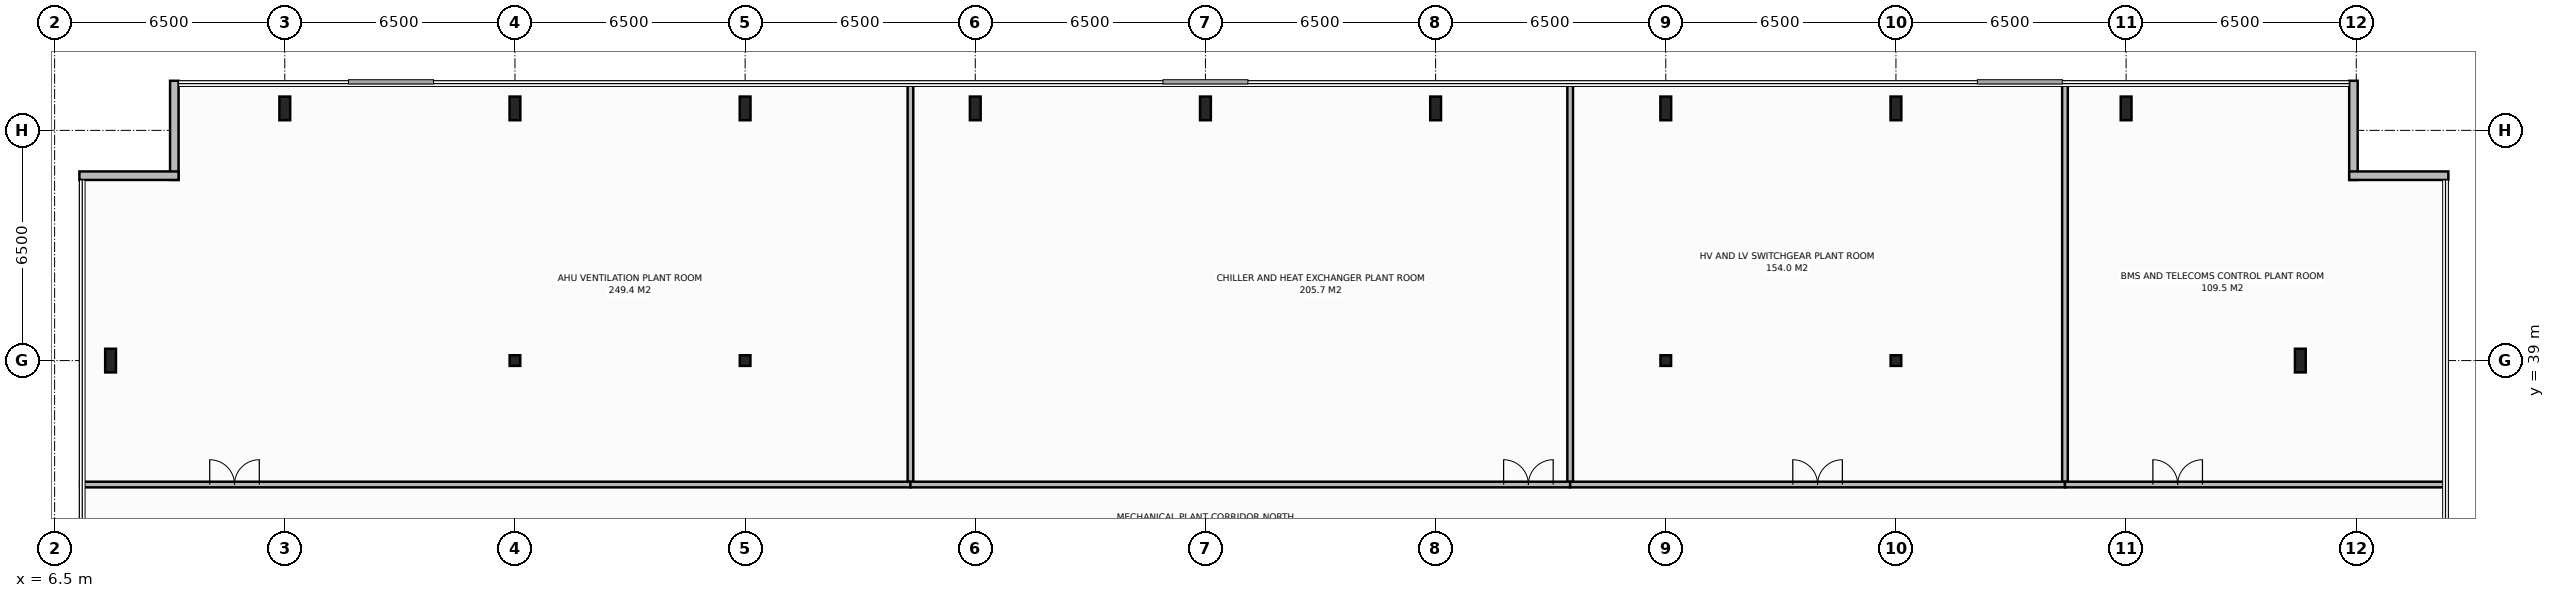
"""IFC4 building model, lengths in metres.
Left out: names, types, materials, properties, quantities, classifications, styles, units other than length and angle.
Written with IfcOpenShell. Run it as: python <this file> out.ifc"""

import sys

from ifc_helpers import new_model, si_unit, direction, frame, frame_2d, origin, origin_2d, place, context, subcontext, project, spatial, rectangle, i_section, extrude, element, fill, save


model = new_model("IFC4")
c1 = context("Model", 3, precision=1e-05, world=origin(), true_north=direction((0.0, 1.0)))
c2 = subcontext(c1, "Body", "Model", "MODEL_VIEW")
j1 = project(units=[si_unit("LENGTHUNIT", "METRE"), si_unit("PLANEANGLEUNIT", "RADIAN")], contexts=[c1])
p1 = place(None, origin())
s1 = spatial("IfcSite", under=j1, at=p1, CompositionType="ELEMENT")
p2 = place(p1, origin())
s2 = spatial("IfcBuilding", under=s1, at=p2, CompositionType="ELEMENT")
p3 = place(p2, frame((0.0, 0.0, 315.4)))
s3 = spatial("IfcBuildingStorey", under=s2, at=p3, CompositionType="ELEMENT", Elevation=315.4)
for number, where, z_axis, x_axis in (
    (1, (19.5, 39.0, 0.0), (0.0, 0.0, 1.0), (1.0, 0.0, 0.0)),
    (2, (58.5, 39.0, 0.0), (0.0, 0.0, 1.0), (1.0, 0.0, 0.0)),
    (3, (26.0, 39.0, 0.0), (0.0, 0.0, 1.0), (1.0, 0.0, 0.0)),
    (4, (52.0, 39.0, 0.0), (0.0, 0.0, 1.0), (1.0, 0.0, 0.0)),
):
    element("IfcColumn", number, at=place(p3, frame(where, z_axis=z_axis, x_axis=x_axis)), inside=s3, PredefinedType="COLUMN", context=c2, shape_type="SweptSolid", body=[
        extrude(i_section(OverallWidth=0.3, OverallDepth=0.3, WebThickness=0.011, FlangeThickness=0.019, at=origin_2d()), origin(), (0.0, 0.0, 1.0), 5.0),
    ])
for number, where, z_axis, x_axis in (
    (5, (13.0, 46.12, 0.0), (0.0, 0.0, 1.0), (1.0, 0.0, 0.0)),
    (6, (19.5, 46.12, 0.0), (0.0, 0.0, 1.0), (1.0, 0.0, 0.0)),
    (7, (26.0, 46.12, 0.0), (0.0, 0.0, 1.0), (1.0, 0.0, 0.0)),
    (8, (32.5, 46.12, 0.0), (0.0, 0.0, 1.0), (1.0, 0.0, 0.0)),
    (9, (39.0, 46.12, 0.0), (0.0, 0.0, 1.0), (1.0, 0.0, 0.0)),
    (10, (45.5, 46.12, 0.0), (0.0, 0.0, 1.0), (1.0, 0.0, 0.0)),
    (11, (52.0, 46.12, 0.0), (0.0, 0.0, 1.0), (1.0, 0.0, 0.0)),
    (12, (58.5, 46.12, 0.0), (0.0, 0.0, 1.0), (1.0, 0.0, 0.0)),
    (13, (65.0, 46.12, 0.0), (0.0, 0.0, 1.0), (1.0, 0.0, 0.0)),
    (14, (8.08, 39.0, 0.0), (0.0, 0.0, 1.0), (1.0, 0.0, 0.0)),
    (15, (69.92, 39.0, 0.0), (0.0, 0.0, 1.0), (1.0, 0.0, 0.0)),
):
    element("IfcColumn", number, at=place(p3, frame(where, z_axis=z_axis, x_axis=x_axis)), inside=s3, PredefinedType="COLUMN", context=c2, shape_type="SweptSolid", body=[
        extrude(i_section(OverallWidth=0.305, OverallDepth=0.668, WebThickness=0.021, FlangeThickness=0.04, at=origin_2d()), origin(), (0.0, 0.0, 1.0), 5.0),
    ])
p4 = place(p3, frame((9.88, 44.1, 0.0), z_axis=(0.0, 0.0, 1.0), x_axis=(0.0, 1.0, 0.0)))
e16 = element("IfcWall", 16, at=p4, inside=s3, PredefinedType="STANDARD", context=c2, shape_type="SweptSolid", body=[
    extrude(rectangle(XDim=2.8, YDim=0.24, at=frame_2d((1.4, 0.0))), origin(), (0.0, 0.0, 1.0), 4.58),
])
p5 = place(p3, frame((7.2, 44.22, 0.0), z_axis=(0.0, 0.0, 1.0), x_axis=(1.0, 0.0, 0.0)))
e17 = element("IfcWall", 17, at=p5, inside=s3, PredefinedType="STANDARD", context=c2, shape_type="SweptSolid", body=[
    extrude(rectangle(XDim=2.8, YDim=0.24, at=frame_2d((1.4, 0.0))), origin(), (0.0, 0.0, 1.0), 4.58),
])
p6 = place(p3, frame((71.42, 46.9, 0.0), z_axis=(0.0, 0.0, 1.0), x_axis=(0.0, -1.0, 0.0)))
e18 = element("IfcWall", 18, at=p6, inside=s3, PredefinedType="STANDARD", context=c2, shape_type="SweptSolid", body=[
    extrude(rectangle(XDim=2.8, YDim=0.24, at=frame_2d((1.4, 0.0))), origin(), (0.0, 0.0, 1.0), 4.58),
])
p7 = place(p3, frame((71.3, 44.22, 0.0), z_axis=(0.0, 0.0, 1.0), x_axis=(1.0, 0.0, 0.0)))
e19 = element("IfcWall", 19, at=p7, inside=s3, PredefinedType="STANDARD", context=c2, shape_type="SweptSolid", body=[
    extrude(rectangle(XDim=2.8, YDim=0.24, at=frame_2d((1.4, 0.0))), origin(), (0.0, 0.0, 1.0), 4.58),
])
p8 = place(p3, frame((30.669, 35.5, 0.0), z_axis=(0.0, 0.0, 1.0), x_axis=(0.0, 1.0, 0.0)))
e20 = element("IfcWall", 20, at=p8, inside=s3, PredefinedType="STANDARD", context=c2, shape_type="SweptSolid", body=[
    extrude(rectangle(XDim=11.38, YDim=0.16, at=frame_2d((5.69, 0.0))), origin(), (0.0, 0.0, 1.0), 4.58),
])
p9 = place(p3, frame((7.22, 35.5, 0.0), z_axis=(0.0, 0.0, 1.0), x_axis=(1.0, 0.0, 0.0)))
e21 = element("IfcWall", 21, at=p9, inside=s3, PredefinedType="STANDARD", context=c2, shape_type="SweptSolid", body=[
    extrude(rectangle(XDim=23.449, YDim=0.16, at=frame_2d((11.725, 0.0))), origin(), (0.0, 0.0, 1.0), 4.58),
])
p10 = place(p9, frame((3.66, 0.0, 0.0)))
e22 = element("IfcOpeningElement", 22, at=p10, cuts=e21, PredefinedType="OPENING", context=c2, shape_type="SweptSolid", body=[
    extrude(rectangle(XDim=1.4, YDim=2.2, at=frame_2d((0.7, 1.1))), frame((0.0, 0.09, 0.0), z_axis=(0.0, -1.0, 0.0), x_axis=(1.0, 0.0, 0.0)), (0.0, 0.0, 1.0), 0.18),
])
p11 = place(p3, frame((49.3, 35.5, 0.0), z_axis=(0.0, 0.0, 1.0), x_axis=(0.0, 1.0, 0.0)))
e23 = element("IfcWall", 23, at=p11, inside=s3, PredefinedType="STANDARD", context=c2, shape_type="SweptSolid", body=[
    extrude(rectangle(XDim=11.38, YDim=0.16, at=frame_2d((5.69, 0.0))), origin(), (0.0, 0.0, 1.0), 4.58),
])
p12 = place(p3, frame((30.669, 35.5, 0.0), z_axis=(0.0, 0.0, 1.0), x_axis=(1.0, 0.0, 0.0)))
e24 = element("IfcWall", 24, at=p12, inside=s3, PredefinedType="STANDARD", context=c2, shape_type="SweptSolid", body=[
    extrude(rectangle(XDim=18.631, YDim=0.16, at=frame_2d((9.316, 0.0))), origin(), (0.0, 0.0, 1.0), 4.58),
])
p13 = place(p12, frame((16.751, 0.0, 0.0)))
e25 = element("IfcOpeningElement", 25, at=p13, cuts=e24, PredefinedType="OPENING", context=c2, shape_type="SweptSolid", body=[
    extrude(rectangle(XDim=1.4, YDim=2.2, at=frame_2d((0.7, 1.1))), frame((0.0, 0.09, 0.0), z_axis=(0.0, -1.0, 0.0), x_axis=(1.0, 0.0, 0.0)), (0.0, 0.0, 1.0), 0.18),
])
p14 = place(p3, frame((63.274, 35.5, 0.0), z_axis=(0.0, 0.0, 1.0), x_axis=(0.0, 1.0, 0.0)))
e26 = element("IfcWall", 26, at=p14, inside=s3, PredefinedType="STANDARD", context=c2, shape_type="SweptSolid", body=[
    extrude(rectangle(XDim=11.38, YDim=0.16, at=frame_2d((5.69, 0.0))), origin(), (0.0, 0.0, 1.0), 4.58),
])
p15 = place(p3, frame((49.3, 35.5, 0.0), z_axis=(0.0, 0.0, 1.0), x_axis=(1.0, 0.0, 0.0)))
e27 = element("IfcWall", 27, at=p15, inside=s3, PredefinedType="STANDARD", context=c2, shape_type="SweptSolid", body=[
    extrude(rectangle(XDim=13.973, YDim=0.16, at=frame_2d((6.987, 0.0))), origin(), (0.0, 0.0, 1.0), 4.58),
])
p16 = place(p15, frame((6.287, 0.0, 0.0)))
e28 = element("IfcOpeningElement", 28, at=p16, cuts=e27, PredefinedType="OPENING", context=c2, shape_type="SweptSolid", body=[
    extrude(rectangle(XDim=1.4, YDim=2.2, at=frame_2d((0.7, 1.1))), frame((0.0, 0.09, 0.0), z_axis=(0.0, -1.0, 0.0), x_axis=(1.0, 0.0, 0.0)), (0.0, 0.0, 1.0), 0.18),
])
p17 = place(p3, frame((63.274, 35.5, 0.0), z_axis=(0.0, 0.0, 1.0), x_axis=(1.0, 0.0, 0.0)))
e29 = element("IfcWall", 29, at=p17, inside=s3, PredefinedType="STANDARD", context=c2, shape_type="SweptSolid", body=[
    extrude(rectangle(XDim=10.806, YDim=0.16, at=frame_2d((5.403, 0.0))), origin(), (0.0, 0.0, 1.0), 4.58),
])
p18 = place(p17, frame((2.482, 0.0, 0.0)))
e30 = element("IfcOpeningElement", 30, at=p18, cuts=e29, PredefinedType="OPENING", context=c2, shape_type="SweptSolid", body=[
    extrude(rectangle(XDim=1.4, YDim=2.2, at=frame_2d((0.7, 1.1))), frame((0.0, 0.09, 0.0), z_axis=(0.0, -1.0, 0.0), x_axis=(1.0, 0.0, 0.0)), (0.0, 0.0, 1.0), 0.18),
])
p19 = place(p10, origin())
e31 = element("IfcDoor", 31, at=p19, inside=s3, OperationType="DOUBLE_DOOR_SINGLE_SWING", PredefinedType="DOOR", context=c2, shape_type="SweptSolid", body=[
    extrude(rectangle(XDim=1.4, YDim=2.2, at=frame_2d((0.7, 1.1))), frame((0.0, 0.025, 0.0), z_axis=(0.0, -1.0, 0.0), x_axis=(1.0, 0.0, 0.0)), (0.0, 0.0, 1.0), 0.05),
])
fill(e22, e31)
p20 = place(p13, origin())
e32 = element("IfcDoor", 32, at=p20, inside=s3, OperationType="DOUBLE_DOOR_SINGLE_SWING", PredefinedType="DOOR", context=c2, shape_type="SweptSolid", body=[
    extrude(rectangle(XDim=1.4, YDim=2.2, at=frame_2d((0.7, 1.1))), frame((0.0, 0.025, 0.0), z_axis=(0.0, -1.0, 0.0), x_axis=(1.0, 0.0, 0.0)), (0.0, 0.0, 1.0), 0.05),
])
fill(e25, e32)
p21 = place(p16, origin())
e33 = element("IfcDoor", 33, at=p21, inside=s3, OperationType="DOUBLE_DOOR_SINGLE_SWING", PredefinedType="DOOR", context=c2, shape_type="SweptSolid", body=[
    extrude(rectangle(XDim=1.4, YDim=2.2, at=frame_2d((0.7, 1.1))), frame((0.0, 0.025, 0.0), z_axis=(0.0, -1.0, 0.0), x_axis=(1.0, 0.0, 0.0)), (0.0, 0.0, 1.0), 0.05),
])
fill(e28, e33)
p22 = place(p18, origin())
e34 = element("IfcDoor", 34, at=p22, inside=s3, OperationType="DOUBLE_DOOR_SINGLE_SWING", PredefinedType="DOOR", context=c2, shape_type="SweptSolid", body=[
    extrude(rectangle(XDim=1.4, YDim=2.2, at=frame_2d((0.7, 1.1))), frame((0.0, 0.025, 0.0), z_axis=(0.0, -1.0, 0.0), x_axis=(1.0, 0.0, 0.0)), (0.0, 0.0, 1.0), 0.05),
])
fill(e30, e34)
save(model, sys.argv[1])
